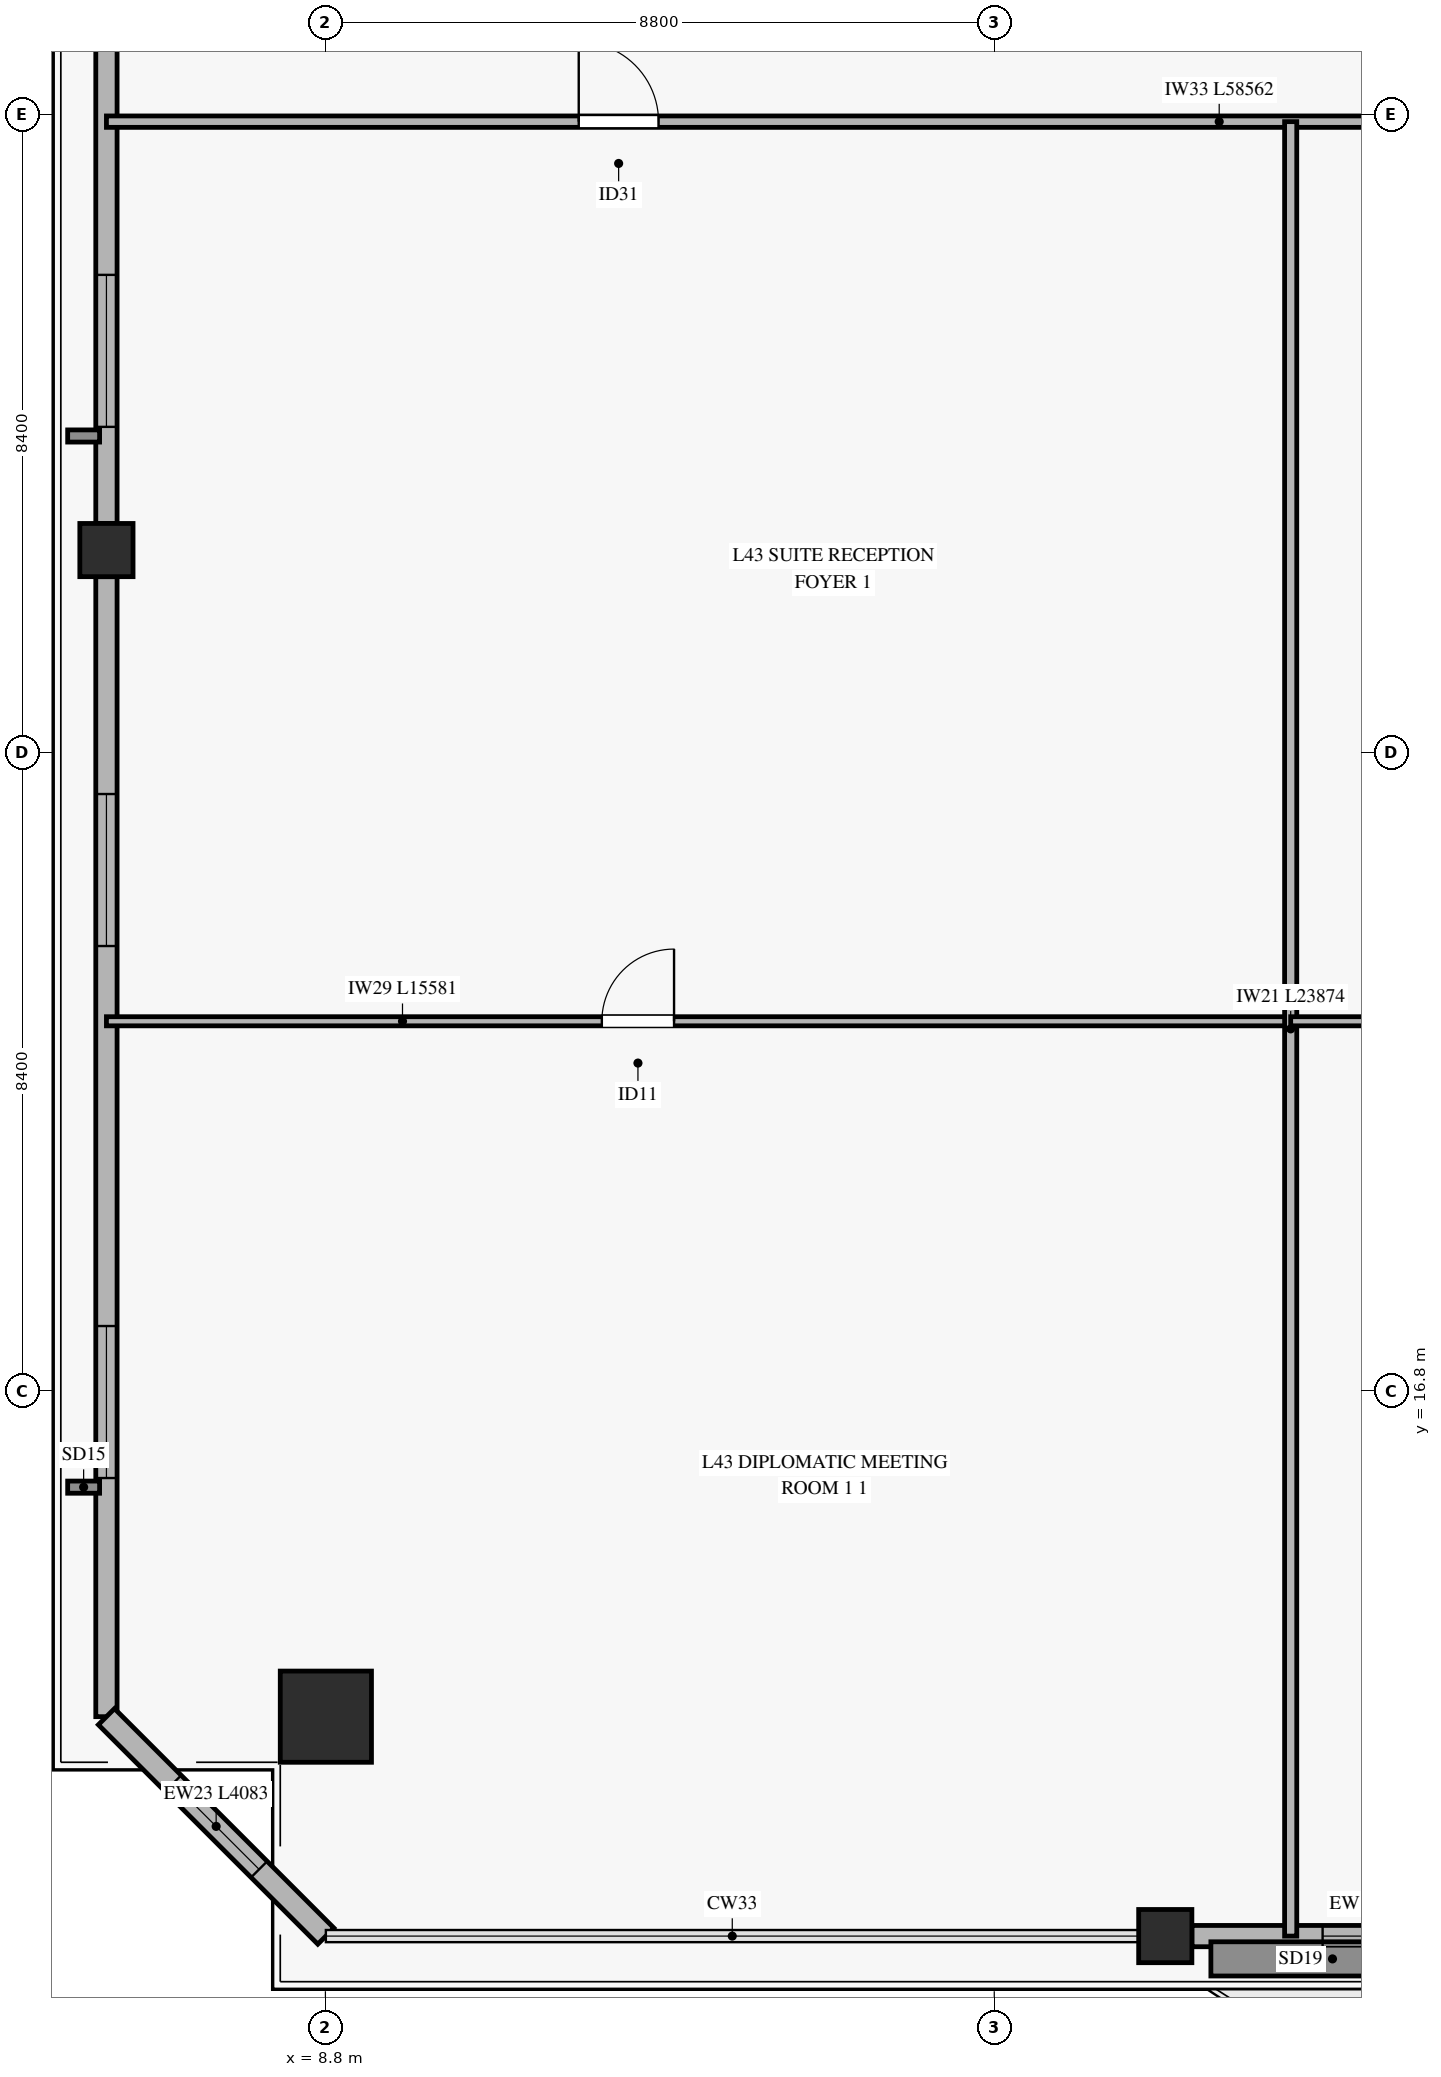
"""IFC4 building model, lengths in metres.
Left out: names, types, materials, properties, quantities, classifications, styles, units other than length and angle.
Written with IfcOpenShell. Run it as: python <this file> out.ifc"""

import sys

from ifc_helpers import new_model, si_unit, direction, frame, frame_2d, origin, origin_2d, place, context, subcontext, project, spatial, rectangle, hollow_rectangle, extrude, source, transform, mapped, element, fill, save


model = new_model("IFC4")
c1 = context("Model", 3, precision=1e-05, world=origin(), true_north=direction((0.0, 1.0)))
c2 = subcontext(c1, "Body", "Model", "MODEL_VIEW")
j1 = project(units=[si_unit("LENGTHUNIT", "METRE"), si_unit("PLANEANGLEUNIT", "RADIAN")], contexts=[c1])
p1 = place(None, origin())
s1 = spatial("IfcSite", under=j1, at=p1, CompositionType="ELEMENT")
p2 = place(p1, origin())
s2 = spatial("IfcBuilding", under=s1, at=p2, CompositionType="ELEMENT")
p3 = place(p2, frame((0.0, 0.0, 173.7)))
s3 = spatial("IfcBuildingStorey", under=s2, at=p3, CompositionType="ELEMENT", Elevation=173.7)
m1 = source(origin(), c2, "Body", "SweptSolid", [
    extrude(hollow_rectangle(XDim=1.2, YDim=1.2, WallThickness=0.055, at=origin_2d()), origin(), (0.0, 0.0, 1.0), 3.27),
])
p4 = place(p3, frame((8.806, 12.513, 0.0), z_axis=(0.0, 0.0, 1.0), x_axis=(1.0, 0.0, 0.0)))
e1 = element("IfcColumn", 1, at=p4, inside=s3, PredefinedType="COLUMN", context=c2, shape_type="MappedRepresentation", body=[
    mapped(m1, transform((0.0, 0.0, 0.0), x_axis=(1.0, 0.0, 0.0), y_axis=(0.0, 1.0, 0.0), z_axis=(0.0, 0.0, 1.0), scale=1.0)),
])
m2 = source(origin(), c2, "Body", "SweptSolid", [
    extrude(hollow_rectangle(XDim=0.7, YDim=0.7, WallThickness=0.032, at=origin_2d()), origin(), (0.0, 0.0, 1.0), 3.27),
])
for number, where, z_axis, x_axis in (
    (2, (19.85, 9.626, 0.0), (0.0, 0.0, 1.0), (1.0, 0.0, 0.0)),
    (3, (5.919, 27.863, 0.0), (0.0, 0.0, 1.0), (1.0, 0.0, 0.0)),
):
    element("IfcColumn", number, at=place(p3, frame(where, z_axis=z_axis, x_axis=x_axis)), inside=s3, PredefinedType="COLUMN", context=c2, shape_type="MappedRepresentation", body=[
        mapped(m2, transform((0.0, 0.0, 0.0), x_axis=(1.0, 0.0, 0.0), y_axis=(0.0, 1.0, 0.0), z_axis=(0.0, 0.0, 1.0), scale=1.0)),
    ])
p5 = place(p3, frame((20.2, 9.626, 0.0), z_axis=(0.0, 0.0, 1.0), x_axis=(1.0, 0.0, 0.0)))
e4 = element("IfcWall", 4, at=p5, inside=s3, PredefinedType="SOLIDWALL", context=c2, shape_type="SweptSolid", body=[
    extrude(rectangle(XDim=10.25, YDim=0.28, at=frame_2d((5.125, 0.0))), origin(), (0.0, 0.0, 1.0), 2.75),
])
p6 = place(p5, frame((4.2, 0.0, 0.0)))
e5 = element("IfcOpeningElement", 5, at=p6, cuts=e4, PredefinedType="OPENING", context=c2, shape_type="SweptSolid", body=[
    extrude(rectangle(XDim=1.8, YDim=2.25, at=frame_2d((0.9, 1.125))), frame((0.0, 0.15, 0.0), z_axis=(0.0, -1.0, 0.0), x_axis=(1.0, 0.0, 0.0)), (0.0, 0.0, 1.0), 0.3),
])
p7 = place(p5, frame((1.72, 0.0, 0.45)))
e6 = element("IfcOpeningElement", 6, at=p7, cuts=e4, PredefinedType="OPENING", context=c2, shape_type="SweptSolid", body=[
    extrude(rectangle(XDim=2.0, YDim=2.0, at=frame_2d((1.0, 1.0))), frame((0.0, 0.15, 0.0), z_axis=(0.0, -1.0, 0.0), x_axis=(1.0, 0.0, 0.0)), (0.0, 0.0, 1.0), 0.3),
])
p8 = place(p5, frame((7.62, 0.0, 0.45)))
e7 = element("IfcOpeningElement", 7, at=p8, cuts=e4, PredefinedType="OPENING", context=c2, shape_type="SweptSolid", body=[
    extrude(rectangle(XDim=1.6, YDim=2.0, at=frame_2d((0.8, 1.0))), frame((0.0, 0.15, 0.0), z_axis=(0.0, -1.0, 0.0), x_axis=(1.0, 0.0, 0.0)), (0.0, 0.0, 1.0), 0.3),
])
p9 = place(p3, frame((5.919, 12.513, 0.0), z_axis=(0.0, 0.0, 1.0), x_axis=(0.0, 1.0, 0.0)))
e8 = element("IfcWall", 8, at=p9, inside=s3, PredefinedType="SOLIDWALL", context=c2, shape_type="SweptSolid", body=[
    extrude(rectangle(XDim=15.0, YDim=0.28, at=frame_2d((7.5, 0.0))), origin(), (0.0, 0.0, 1.0), 2.75),
])
p10 = place(p9, frame((3.14, 0.0, 0.45)))
e9 = element("IfcOpeningElement", 9, at=p10, cuts=e8, PredefinedType="OPENING", context=c2, shape_type="SweptSolid", body=[
    extrude(rectangle(XDim=2.0, YDim=2.0, at=frame_2d((1.0, 1.0))), frame((0.0, 0.15, 0.0), z_axis=(0.0, -1.0, 0.0), x_axis=(1.0, 0.0, 0.0)), (0.0, 0.0, 1.0), 0.3),
])
p11 = place(p9, frame((10.14, 0.0, 0.45)))
e10 = element("IfcOpeningElement", 10, at=p11, cuts=e8, PredefinedType="OPENING", context=c2, shape_type="SweptSolid", body=[
    extrude(rectangle(XDim=2.0, YDim=2.0, at=frame_2d((1.0, 1.0))), frame((0.0, 0.15, 0.0), z_axis=(0.0, -1.0, 0.0), x_axis=(1.0, 0.0, 0.0)), (0.0, 0.0, 1.0), 0.3),
])
p12 = place(p3, frame((5.919, 28.213, 0.0), z_axis=(0.0, 0.0, 1.0), x_axis=(0.0, 1.0, 0.0)))
e11 = element("IfcWall", 11, at=p12, inside=s3, PredefinedType="SOLIDWALL", context=c2, shape_type="SweptSolid", body=[
    extrude(rectangle(XDim=15.0, YDim=0.28, at=frame_2d((7.5, 0.0))), origin(), (0.0, 0.0, 1.0), 2.75),
])
p13 = place(p12, frame((1.271, 0.0, 0.45)))
e12 = element("IfcOpeningElement", 12, at=p13, cuts=e11, PredefinedType="OPENING", context=c2, shape_type="SweptSolid", body=[
    extrude(rectangle(XDim=2.0, YDim=2.0, at=frame_2d((1.0, 1.0))), frame((0.0, 0.15, 0.0), z_axis=(0.0, -1.0, 0.0), x_axis=(1.0, 0.0, 0.0)), (0.0, 0.0, 1.0), 0.3),
])
p14 = place(p12, frame((11.685, 0.0, 0.45)))
e13 = element("IfcOpeningElement", 13, at=p14, cuts=e11, PredefinedType="OPENING", context=c2, shape_type="SweptSolid", body=[
    extrude(rectangle(XDim=2.0, YDim=2.0, at=frame_2d((1.0, 1.0))), frame((0.0, 0.15, 0.0), z_axis=(0.0, -1.0, 0.0), x_axis=(1.0, 0.0, 0.0)), (0.0, 0.0, 1.0), 0.3),
])
p15 = place(p3, frame((5.919, 12.513, 0.0), z_axis=(0.0, 0.0, 1.0), x_axis=(0.707106781187, -0.707106781187, 0.0)))
e14 = element("IfcWall", 14, at=p15, inside=s3, PredefinedType="SOLIDWALL", context=c2, shape_type="SweptSolid", body=[
    extrude(rectangle(XDim=4.083, YDim=0.3, at=frame_2d((2.042, 0.0))), origin(), (0.0, 0.0, 1.0), 2.75),
])
p16 = place(p15, frame((1.241, 0.0, 0.45)))
e15 = element("IfcOpeningElement", 15, at=p16, cuts=e14, PredefinedType="OPENING", context=c2, shape_type="SweptSolid", body=[
    extrude(rectangle(XDim=1.6, YDim=2.0, at=frame_2d((0.8, 1.0))), frame((0.0, 0.16, 0.0), z_axis=(0.0, -1.0, 0.0), x_axis=(1.0, 0.0, 0.0)), (0.0, 0.0, 1.0), 0.32),
])
p17 = place(p3, frame((5.919, 33.5, 0.0), z_axis=(0.0, 0.0, 1.0), x_axis=(1.0, 0.0, 0.0)))
e16 = element("IfcWall", 16, at=p17, inside=s3, PredefinedType="PARTITIONING", context=c2, shape_type="SweptSolid", body=[
    extrude(rectangle(XDim=58.562, YDim=0.15, at=frame_2d((29.281, 0.0))), origin(), (0.0, 0.0, 1.0), 2.455),
])
p18 = place(p17, frame((6.214, 0.0, 0.0)))
e17 = element("IfcOpeningElement", 17, at=p18, cuts=e16, PredefinedType="OPENING", context=c2, shape_type="SweptSolid", body=[
    extrude(rectangle(XDim=1.05, YDim=2.15, at=frame_2d((0.525, 1.075))), frame((0.0, 0.085, 0.0), z_axis=(0.0, -1.0, 0.0), x_axis=(1.0, 0.0, 0.0)), (0.0, 0.0, 1.0), 0.17),
])
p19 = place(p17, frame((17.992, 0.0, 0.0)))
e18 = element("IfcOpeningElement", 18, at=p19, cuts=e16, PredefinedType="OPENING", context=c2, shape_type="SweptSolid", body=[
    extrude(rectangle(XDim=1.05, YDim=2.15, at=frame_2d((0.525, 1.075))), frame((0.0, 0.085, 0.0), z_axis=(0.0, -1.0, 0.0), x_axis=(1.0, 0.0, 0.0)), (0.0, 0.0, 1.0), 0.17),
])
p20 = place(p17, frame((23.322, 0.0, 0.0)))
e19 = element("IfcOpeningElement", 19, at=p20, cuts=e16, PredefinedType="OPENING", context=c2, shape_type="SweptSolid", body=[
    extrude(rectangle(XDim=1.05, YDim=2.15, at=frame_2d((0.525, 1.075))), frame((0.0, 0.085, 0.0), z_axis=(0.0, -1.0, 0.0), x_axis=(1.0, 0.0, 0.0)), (0.0, 0.0, 1.0), 0.17),
])
p21 = place(p17, frame((27.997, 0.0, 0.0)))
e20 = element("IfcOpeningElement", 20, at=p21, cuts=e16, PredefinedType="OPENING", context=c2, shape_type="SweptSolid", body=[
    extrude(rectangle(XDim=1.05, YDim=2.15, at=frame_2d((0.525, 1.075))), frame((0.0, 0.085, 0.0), z_axis=(0.0, -1.0, 0.0), x_axis=(1.0, 0.0, 0.0)), (0.0, 0.0, 1.0), 0.17),
])
p22 = place(p17, frame((32.397, 0.0, 0.0)))
e21 = element("IfcOpeningElement", 21, at=p22, cuts=e16, PredefinedType="OPENING", context=c2, shape_type="SweptSolid", body=[
    extrude(rectangle(XDim=1.05, YDim=2.15, at=frame_2d((0.525, 1.075))), frame((0.0, 0.085, 0.0), z_axis=(0.0, -1.0, 0.0), x_axis=(1.0, 0.0, 0.0)), (0.0, 0.0, 1.0), 0.17),
])
p23 = place(p17, frame((36.877, 0.0, 0.0)))
e22 = element("IfcOpeningElement", 22, at=p23, cuts=e16, PredefinedType="OPENING", context=c2, shape_type="SweptSolid", body=[
    extrude(rectangle(XDim=1.05, YDim=2.15, at=frame_2d((0.525, 1.075))), frame((0.0, 0.085, 0.0), z_axis=(0.0, -1.0, 0.0), x_axis=(1.0, 0.0, 0.0)), (0.0, 0.0, 1.0), 0.17),
])
p24 = place(p17, frame((46.701, 0.0, 0.0)))
e23 = element("IfcOpeningElement", 23, at=p24, cuts=e16, PredefinedType="OPENING", context=c2, shape_type="SweptSolid", body=[
    extrude(rectangle(XDim=1.05, YDim=2.15, at=frame_2d((0.525, 1.075))), frame((0.0, 0.085, 0.0), z_axis=(0.0, -1.0, 0.0), x_axis=(1.0, 0.0, 0.0)), (0.0, 0.0, 1.0), 0.17),
])
p25 = place(p3, frame((5.919, 21.663, 0.0), z_axis=(0.0, 0.0, 1.0), x_axis=(1.0, 0.0, 0.0)))
e24 = element("IfcWall", 24, at=p25, inside=s3, PredefinedType="PARTITIONING", context=c2, shape_type="SweptSolid", body=[
    extrude(rectangle(XDim=15.581, YDim=0.12, at=frame_2d((7.791, 0.0))), origin(), (0.0, 0.0, 1.0), 2.455),
])
p26 = place(p25, frame((6.518, 0.0, 0.0)))
e25 = element("IfcOpeningElement", 25, at=p26, cuts=e24, PredefinedType="OPENING", context=c2, shape_type="SweptSolid", body=[
    extrude(rectangle(XDim=0.95, YDim=2.1, at=frame_2d((0.475, 1.05))), frame((0.0, 0.07, 0.0), z_axis=(0.0, -1.0, 0.0), x_axis=(1.0, 0.0, 0.0)), (0.0, 0.0, 1.0), 0.14),
])
p27 = place(p3, frame((21.5, 9.626, 0.0), z_axis=(0.0, 0.0, 1.0), x_axis=(0.0, 1.0, 0.0)))
e26 = element("IfcWall", 26, at=p27, inside=s3, PredefinedType="PARTITIONING", context=c2, shape_type="SweptSolid", body=[
    extrude(rectangle(XDim=23.874, YDim=0.16, at=frame_2d((11.937, 0.0))), origin(), (0.0, 0.0, 1.0), 2.755),
])
p28 = place(p3, frame((21.5, 21.663, 0.0), z_axis=(0.0, 0.0, 1.0), x_axis=(1.0, 0.0, 0.0)))
e27 = element("IfcWall", 27, at=p28, inside=s3, PredefinedType="PARTITIONING", context=c2, shape_type="SweptSolid", body=[
    extrude(rectangle(XDim=5.9, YDim=0.12, at=frame_2d((2.95, 0.0))), origin(), (0.0, 0.0, 1.0), 3.27),
])
p29 = place(p28, frame((2.526, 0.0, 0.0)))
e28 = element("IfcOpeningElement", 28, at=p29, cuts=e27, PredefinedType="OPENING", context=c2, shape_type="SweptSolid", body=[
    extrude(rectangle(XDim=0.95, YDim=2.1, at=frame_2d((0.475, 1.05))), frame((0.0, 0.07, 0.0), z_axis=(0.0, -1.0, 0.0), x_axis=(1.0, 0.0, 0.0)), (0.0, 0.0, 1.0), 0.14),
])
m3 = source(origin(), c2, "Body", "SweptSolid", [
    extrude(rectangle(XDim=2.0, YDim=2.0, at=frame_2d((1.0, 1.0))), frame((0.0, 0.03, 0.0), z_axis=(0.0, -1.0, 0.0), x_axis=(1.0, 0.0, 0.0)), (0.0, 0.0, 1.0), 0.06),
])
p30 = place(p7, origin())
e29 = element("IfcWindow", 29, at=p30, inside=s3, PartitioningType="SINGLE_PANEL", PredefinedType="WINDOW", context=c2, shape_type="MappedRepresentation", body=[
    mapped(m3, transform((0.0, 0.0, 0.0), x_axis=(1.0, 0.0, 0.0), y_axis=(0.0, 1.0, 0.0), z_axis=(0.0, 0.0, 1.0), scale=1.0)),
])
fill(e6, e29)
p31 = place(p10, origin())
e30 = element("IfcWindow", 30, at=p31, inside=s3, PartitioningType="SINGLE_PANEL", PredefinedType="WINDOW", context=c2, shape_type="MappedRepresentation", body=[
    mapped(m3, transform((0.0, 0.0, 0.0), x_axis=(1.0, 0.0, 0.0), y_axis=(0.0, 1.0, 0.0), z_axis=(0.0, 0.0, 1.0), scale=1.0)),
])
fill(e9, e30)
p32 = place(p11, origin())
e31 = element("IfcWindow", 31, at=p32, inside=s3, PartitioningType="SINGLE_PANEL", PredefinedType="WINDOW", context=c2, shape_type="MappedRepresentation", body=[
    mapped(m3, transform((0.0, 0.0, 0.0), x_axis=(1.0, 0.0, 0.0), y_axis=(0.0, 1.0, 0.0), z_axis=(0.0, 0.0, 1.0), scale=1.0)),
])
fill(e10, e31)
p33 = place(p13, origin())
e32 = element("IfcWindow", 32, at=p33, inside=s3, PartitioningType="SINGLE_PANEL", PredefinedType="WINDOW", context=c2, shape_type="MappedRepresentation", body=[
    mapped(m3, transform((0.0, 0.0, 0.0), x_axis=(1.0, 0.0, 0.0), y_axis=(0.0, 1.0, 0.0), z_axis=(0.0, 0.0, 1.0), scale=1.0)),
])
fill(e12, e32)
m4 = source(origin(), c2, "Body", "SweptSolid", [
    extrude(rectangle(XDim=1.6, YDim=2.0, at=frame_2d((0.8, 1.0))), frame((0.0, 0.03, 0.0), z_axis=(0.0, -1.0, 0.0), x_axis=(1.0, 0.0, 0.0)), (0.0, 0.0, 1.0), 0.06),
])
p34 = place(p16, origin())
e33 = element("IfcWindow", 33, at=p34, inside=s3, PartitioningType="SINGLE_PANEL", PredefinedType="WINDOW", context=c2, shape_type="MappedRepresentation", body=[
    mapped(m4, transform((0.0, 0.0, 0.0), x_axis=(1.0, 0.0, 0.0), y_axis=(0.0, 1.0, 0.0), z_axis=(0.0, 0.0, 1.0), scale=1.0)),
])
fill(e15, e33)
m5 = source(origin(), c2, "Body", "SweptSolid", [
    extrude(rectangle(XDim=1.05, YDim=2.15, at=frame_2d((0.525, 1.075))), frame((0.0, 0.025, 0.0), z_axis=(0.0, -1.0, 0.0), x_axis=(1.0, 0.0, 0.0)), (0.0, 0.0, 1.0), 0.05),
])
p35 = place(p18, origin())
e34 = element("IfcDoor", 34, at=p35, inside=s3, OperationType="SINGLE_SWING_LEFT", PredefinedType="DOOR", context=c2, shape_type="MappedRepresentation", body=[
    mapped(m5, transform((0.0, 0.0, 0.0), x_axis=(1.0, 0.0, 0.0), y_axis=(0.0, 1.0, 0.0), z_axis=(0.0, 0.0, 1.0), scale=1.0)),
])
fill(e17, e34)
m6 = source(origin(), c2, "Body", "SweptSolid", [
    extrude(rectangle(XDim=0.95, YDim=2.1, at=frame_2d((0.475, 1.05))), frame((0.0, 0.025, 0.0), z_axis=(0.0, -1.0, 0.0), x_axis=(1.0, 0.0, 0.0)), (0.0, 0.0, 1.0), 0.05),
])
p36 = place(p26, origin())
e35 = element("IfcDoor", 35, at=p36, inside=s3, OperationType="SINGLE_SWING_RIGHT", PredefinedType="DOOR", context=c2, shape_type="MappedRepresentation", body=[
    mapped(m6, transform((0.0, 0.0, 0.0), x_axis=(1.0, 0.0, 0.0), y_axis=(0.0, 1.0, 0.0), z_axis=(0.0, 0.0, 1.0), scale=1.0)),
])
fill(e25, e35)
save(model, sys.argv[1])
